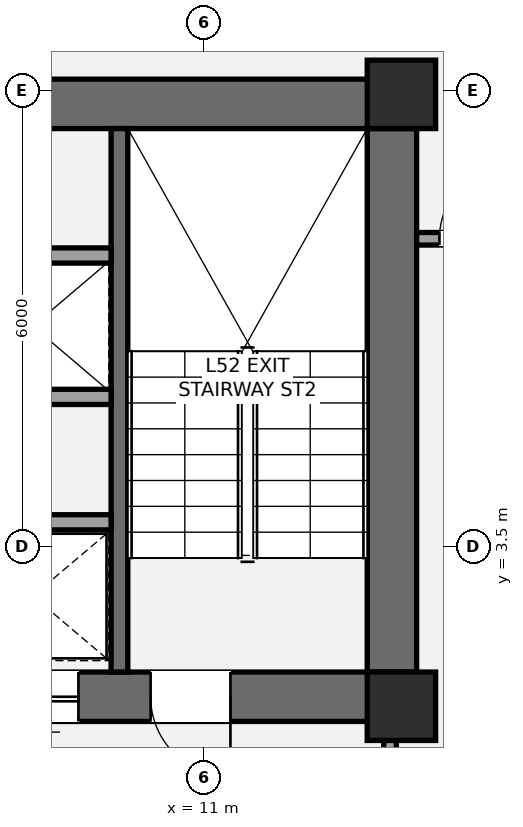
"""IFC4 building model, lengths in metres.
Left out: names, types, materials, properties, quantities, classifications, styles, units other than length and angle.
Written with IfcOpenShell. Run it as: python <this file> out.ifc"""

import sys

from ifc_helpers import new_model, si_unit, direction, frame, frame_2d, origin, origin_2d, place, context, subcontext, project, spatial, rectangle, extrude, element, fill, save


model = new_model("IFC4")
c1 = context("Model", 3, precision=1e-05, world=origin(), true_north=direction((0.0, 1.0)))
c2 = subcontext(c1, "Body", "Model", "MODEL_VIEW")
j1 = project(units=[si_unit("LENGTHUNIT", "METRE"), si_unit("PLANEANGLEUNIT", "RADIAN")], contexts=[c1])
p1 = place(None, origin())
s1 = spatial("IfcSite", under=j1, at=p1, CompositionType="ELEMENT")
p2 = place(p1, origin())
s2 = spatial("IfcBuilding", under=s1, at=p2, CompositionType="ELEMENT")
p3 = place(p2, frame((0.0, 0.0, 188.6)))
s3 = spatial("IfcBuildingStorey", under=s2, at=p3, CompositionType="ELEMENT", Elevation=188.6)
p4 = place(p3, frame((13.475, 1.2, 0.0), z_axis=(0.0, 0.0, 1.0), x_axis=(0.0, 1.0, 0.0)))
e1 = element("IfcWall", 1, at=p4, inside=s3, PredefinedType="SHEAR", context=c2, shape_type="SweptSolid", body=[
    extrude(rectangle(XDim=8.45, YDim=0.65, at=frame_2d((4.225, 0.0))), origin(), (0.0, 0.0, 1.0), 3.2),
])
p5 = place(p3, frame((4.475, 9.325, 0.0), z_axis=(0.0, 0.0, 1.0), x_axis=(1.0, 0.0, 0.0)))
e2 = element("IfcWall", 2, at=p5, inside=s3, PredefinedType="SHEAR", context=c2, shape_type="SweptSolid", body=[
    extrude(rectangle(XDim=9.325, YDim=0.65, at=frame_2d((4.663, 0.0))), origin(), (0.0, 0.0, 1.0), 3.2),
])
p6 = place(p3, frame((13.8, 1.525, 0.0), z_axis=(0.0, 0.0, 1.0), x_axis=(-1.0, 0.0, 0.0)))
e3 = element("IfcWall", 3, at=p6, inside=s3, PredefinedType="SHEAR", context=c2, shape_type="SweptSolid", body=[
    extrude(rectangle(XDim=8.925, YDim=0.65, at=frame_2d((4.462, 0.0))), origin(), (0.0, 0.0, 1.0), 3.2),
])
p7 = place(p6, frame((2.45, 0.0, 0.0)))
e4 = element("IfcOpeningElement", 4, at=p7, cuts=e3, PredefinedType="OPENING", context=c2, shape_type="SweptSolid", body=[
    extrude(rectangle(XDim=1.05, YDim=2.15, at=frame_2d((0.525, 1.075))), frame((0.0, 0.335, 0.0), z_axis=(0.0, -1.0, 0.0), x_axis=(1.0, 0.0, 0.0)), (0.0, 0.0, 1.0), 0.67),
])
p8 = place(p6, frame((4.45, 0.0, 0.0)))
e5 = element("IfcOpeningElement", 5, at=p8, cuts=e3, PredefinedType="OPENING", context=c2, shape_type="SweptSolid", body=[
    extrude(rectangle(XDim=1.1, YDim=2.2, at=frame_2d((0.55, 1.1))), frame((0.0, 0.335, 0.0), z_axis=(0.0, -1.0, 0.0), x_axis=(1.0, 0.0, 0.0)), (0.0, 0.0, 1.0), 0.67),
])
p9 = place(p3, frame((9.89, 1.85, 0.0), z_axis=(0.0, 0.0, 1.0), x_axis=(0.0, 1.0, 0.0)))
e6 = element("IfcWall", 6, at=p9, inside=s3, PredefinedType="SHEAR", context=c2, shape_type="SweptSolid", body=[
    extrude(rectangle(XDim=7.15, YDim=0.22, at=frame_2d((3.575, 0.0))), origin(), (0.0, 0.0, 1.0), 3.2),
])
for number, where, z_axis, x_axis in (
    (7, (13.6, 1.4, 0.0), (0.0, 0.0, 1.0), (1.0, 0.0, 0.0)),
    (8, (13.6, 9.45, 0.0), (0.0, 0.0, 1.0), (1.0, 0.0, 0.0)),
):
    element("IfcColumn", number, at=place(p3, frame(where, z_axis=z_axis, x_axis=x_axis)), inside=s3, PredefinedType="COLUMN", context=c2, shape_type="SweptSolid", body=[
        extrude(rectangle(XDim=0.9, YDim=0.9, at=origin_2d()), origin(), (0.0, 0.0, 1.0), 3.2),
    ])
p10 = place(p3, frame((13.45, -2.15, 0.0), z_axis=(0.0, 0.0, 1.0), x_axis=(0.0, 1.0, 0.0)))
e9 = element("IfcWall", 9, at=p10, inside=s3, PredefinedType="PARTITIONING", context=c2, shape_type="SweptSolid", body=[
    extrude(rectangle(XDim=3.4, YDim=0.165, at=frame_2d((1.7, 0.0))), origin(), (0.0, 0.0, 1.0), 2.473),
])
p11 = place(p10, frame((1.15, 0.0, 0.0)))
e10 = element("IfcOpeningElement", 10, at=p11, cuts=e9, PredefinedType="OPENING", context=c2, shape_type="SweptSolid", body=[
    extrude(rectangle(XDim=1.05, YDim=2.15, at=frame_2d((0.525, 1.075))), frame((0.0, 0.093, 0.0), z_axis=(0.0, -1.0, 0.0), x_axis=(1.0, 0.0, 0.0)), (0.0, 0.0, 1.0), 0.185),
])
p12 = place(p3, frame((5.525, 3.82, 0.0), z_axis=(0.0, 0.0, 1.0), x_axis=(1.0, 0.0, 0.0)))
e11 = element("IfcWall", 11, at=p12, inside=s3, PredefinedType="SOLIDWALL", context=c2, shape_type="SweptSolid", body=[
    extrude(rectangle(XDim=4.255, YDim=0.2, at=frame_2d((2.127, 0.0))), origin(), (0.0, 0.0, 1.0), 3.02),
])
p13 = place(p12, frame((0.65, 0.0, 0.0)))
e12 = element("IfcOpeningElement", 12, at=p13, cuts=e11, PredefinedType="OPENING", context=c2, shape_type="SweptSolid", body=[
    extrude(rectangle(XDim=1.2, YDim=2.2, at=frame_2d((0.6, 1.1))), frame((0.0, 0.11, 0.0), z_axis=(0.0, -1.0, 0.0), x_axis=(1.0, 0.0, 0.0)), (0.0, 0.0, 1.0), 0.22),
])
for number, where, z_axis, x_axis in (
    (13, (5.525, 5.47, 0.0), (0.0, 0.0, 1.0), (1.0, 0.0, 0.0)),
    (14, (5.525, 7.33, 0.0), (0.0, 0.0, 1.0), (1.0, 0.0, 0.0)),
):
    element("IfcWall", number, at=place(p3, frame(where, z_axis=z_axis, x_axis=x_axis)), inside=s3, PredefinedType="SOLIDWALL", context=c2, shape_type="SweptSolid", body=[
        extrude(rectangle(XDim=4.255, YDim=0.2, at=frame_2d((2.127, 0.0))), origin(), (0.0, 0.0, 1.0), 3.02),
    ])
p14 = place(p3, frame((13.8, 7.55, 0.0), z_axis=(0.0, 0.0, 1.0), x_axis=(1.0, 0.0, 0.0)))
e15 = element("IfcWall", 15, at=p14, inside=s3, PredefinedType="PARTITIONING", context=c2, shape_type="SweptSolid", body=[
    extrude(rectangle(XDim=1.75, YDim=0.165, at=frame_2d((0.875, 0.0))), origin(), (0.0, 0.0, 1.0), 3.02),
])
p15 = place(p14, frame((0.3, 0.0, 0.0)))
e16 = element("IfcOpeningElement", 16, at=p15, cuts=e15, PredefinedType="OPENING", context=c2, shape_type="SweptSolid", body=[
    extrude(rectangle(XDim=1.0, YDim=2.15, at=frame_2d((0.5, 1.075))), frame((0.0, 0.093, 0.0), z_axis=(0.0, -1.0, 0.0), x_axis=(1.0, 0.0, 0.0)), (0.0, 0.0, 1.0), 0.185),
])
p16 = place(p7, origin())
e17 = element("IfcDoor", 17, at=p16, inside=s3, OperationType="SINGLE_SWING_LEFT", PredefinedType="DOOR", context=c2, shape_type="SweptSolid", body=[
    extrude(rectangle(XDim=1.05, YDim=2.15, at=frame_2d((0.525, 1.075))), frame((0.0, 0.025, 0.0), z_axis=(0.0, -1.0, 0.0), x_axis=(1.0, 0.0, 0.0)), (0.0, 0.0, 1.0), 0.05),
])
fill(e4, e17)
p17 = place(p8, origin())
e18 = element("IfcDoor", 18, at=p17, inside=s3, OperationType="SLIDING_TO_LEFT", PredefinedType="DOOR", context=c2, shape_type="SweptSolid", body=[
    extrude(rectangle(XDim=1.1, YDim=2.2, at=frame_2d((0.55, 1.1))), frame((0.0, 0.025, 0.0), z_axis=(0.0, -1.0, 0.0), x_axis=(1.0, 0.0, 0.0)), (0.0, 0.0, 1.0), 0.05),
])
fill(e5, e18)
p18 = place(p15, origin())
e19 = element("IfcDoor", 19, at=p18, inside=s3, OperationType="SINGLE_SWING_RIGHT", PredefinedType="DOOR", context=c2, shape_type="SweptSolid", body=[
    extrude(rectangle(XDim=1.0, YDim=2.15, at=frame_2d((0.5, 1.075))), frame((0.0, 0.025, 0.0), z_axis=(0.0, -1.0, 0.0), x_axis=(1.0, 0.0, 0.0)), (0.0, 0.0, 1.0), 0.05),
])
fill(e16, e19)
save(model, sys.argv[1])
